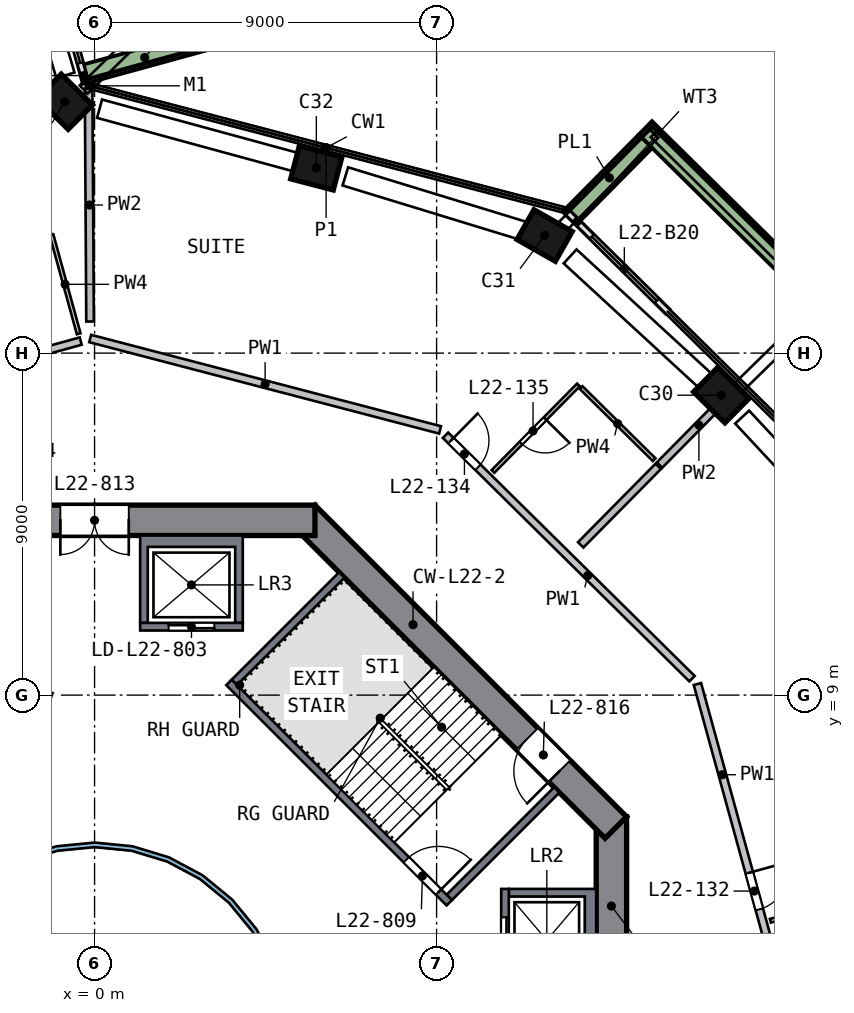
"""IFC4 building model, lengths in metres.
Left out: names, types, materials, properties, quantities, classifications, styles, units other than length and angle.
Written with IfcOpenShell. Run it as: python <this file> out.ifc"""

import sys

from ifc_helpers import new_model, si_unit, direction, frame, frame_2d, origin, origin_2d, place, context, subcontext, project, spatial, polyline, rectangle, outline, extrude, element, fill, save


model = new_model("IFC4")
c1 = context("Model", 3, precision=1e-05, world=origin(), true_north=direction((0.0, 1.0)))
c2 = subcontext(c1, "Body", "Model", "MODEL_VIEW")
j1 = project(units=[si_unit("LENGTHUNIT", "METRE"), si_unit("PLANEANGLEUNIT", "RADIAN")], contexts=[c1])
p1 = place(None, origin())
s1 = spatial("IfcSite", under=j1, at=p1, CompositionType="ELEMENT")
p2 = place(p1, origin())
s2 = spatial("IfcBuilding", under=s1, at=p2, CompositionType="ELEMENT")
p3 = place(p2, frame((0.0, 0.0, 96.5)))
s3 = spatial("IfcBuildingStorey", under=s2, at=p3, CompositionType="ELEMENT", Elevation=96.5)
p4 = place(p3, frame((16.588, 16.798, 0.0), z_axis=(-0.080537401, 0.078255888, 0.993674868), x_axis=(-0.706754906, 0.698489901, -0.112291409)))
e1 = element("IfcColumn", 1, at=p4, inside=s3, PredefinedType="COLUMN", context=c2, shape_type="SweptSolid", body=[
    extrude(rectangle(XDim=1.15, YDim=0.9, at=origin_2d()), origin(), (0.0, 0.0, 1.0), 3.21),
])
p5 = place(p3, frame((11.965, 21.027, 0.0), z_axis=(-0.100506543, 0.056031257, 0.993357404), x_axis=(0.863500308, -0.491046936, 0.115065743)))
e2 = element("IfcColumn", 2, at=p5, inside=s3, PredefinedType="COLUMN", context=c2, shape_type="SweptSolid", body=[
    extrude(rectangle(XDim=1.15, YDim=0.9, at=origin_2d()), origin(), (0.0, 0.0, 1.0), 3.211),
])
p6 = place(p3, frame((5.967, 22.842, 0.0), z_axis=(-0.108904014, 0.027454154, 0.993673078), x_axis=(-0.961432329, 0.251067637, -0.112307249)))
e3 = element("IfcColumn", 3, at=p6, inside=s3, PredefinedType="COLUMN", context=c2, shape_type="SweptSolid", body=[
    extrude(rectangle(XDim=1.15, YDim=0.9, at=origin_2d()), origin(), (0.0, 0.0, 1.0), 3.21),
])
p7 = place(p3, frame((-0.645, 24.621, 0.0), z_axis=(-0.117051977, -0.004028412, 0.99311762), x_axis=(0.704297636, -0.705365784, 0.080149546)))
e4 = element("IfcColumn", 4, at=p7, inside=s3, PredefinedType="COLUMN", context=c2, shape_type="SweptSolid", body=[
    extrude(rectangle(XDim=1.15, YDim=0.9, at=origin_2d()), origin(), (0.0, 0.0, 1.0), 3.212),
])
p8 = place(p3, frame((13.6, -5.799, 0.0), z_axis=(0.0, 0.0, 1.0), x_axis=(0.0, 1.0, 0.0)))
e5 = element("IfcWall", 5, at=p8, inside=s3, PredefinedType="SHEAR", context=c2, shape_type="SweptSolid", body=[
    extrude(rectangle(XDim=11.598, YDim=0.8, at=frame_2d((5.799, 0.0))), origin(), (0.0, 0.0, 1.0), 3.5),
])
p9 = place(p8, frame((4.899, 0.0, 0.0)))
e6 = element("IfcOpeningElement", 6, at=p9, cuts=e5, PredefinedType="OPENING", context=c2, shape_type="SweptSolid", body=[
    extrude(rectangle(XDim=1.8, YDim=2.1, at=frame_2d((0.9, 1.05))), frame((0.0, 0.41, 0.0), z_axis=(0.0, -1.0, 0.0), x_axis=(1.0, 0.0, 0.0)), (0.0, 0.0, 1.0), 0.82),
])
p10 = place(p3, frame((13.717, 5.516, 0.0), z_axis=(0.0, 0.0, 1.0), x_axis=(-0.707106781, 0.707106781, 0.0)))
e7 = element("IfcWall", 7, at=p10, inside=s3, PredefinedType="SHEAR", context=c2, shape_type="SweptSolid", body=[
    extrude(rectangle(XDim=11.598, YDim=0.8, at=frame_2d((5.799, 0.0))), origin(), (0.0, 0.0, 1.0), 3.5),
])
p11 = place(p10, frame((2.099, 0.0, 0.0)))
e8 = element("IfcOpeningElement", 8, at=p11, cuts=e7, PredefinedType="OPENING", context=c2, shape_type="SweptSolid", body=[
    extrude(rectangle(XDim=1.2, YDim=2.1, at=frame_2d((0.6, 1.05))), frame((0.0, 0.41, 0.0), z_axis=(0.0, -1.0, 0.0), x_axis=(1.0, 0.0, 0.0)), (0.0, 0.0, 1.0), 0.82),
])
p12 = place(p3, frame((5.799, 13.6, 0.0), z_axis=(0.0, 0.0, 1.0), x_axis=(-1.0, 0.0, 0.0)))
e9 = element("IfcWall", 9, at=p12, inside=s3, PredefinedType="SHEAR", context=c2, shape_type="SweptSolid", body=[
    extrude(rectangle(XDim=11.598, YDim=0.8, at=frame_2d((5.799, 0.0))), origin(), (0.0, 0.0, 1.0), 3.5),
])
p13 = place(p12, frame((4.899, 0.0, 0.0)))
e10 = element("IfcOpeningElement", 10, at=p13, cuts=e9, PredefinedType="OPENING", context=c2, shape_type="SweptSolid", body=[
    extrude(rectangle(XDim=1.8, YDim=2.1, at=frame_2d((0.9, 1.05))), frame((0.0, 0.41, 0.0), z_axis=(0.0, -1.0, 0.0), x_axis=(1.0, 0.0, 0.0)), (0.0, 0.0, 1.0), 0.82),
])
p14 = place(p3, frame((-0.249, 25.161, 0.0), z_axis=(0.0, 0.0, 1.0), x_axis=(-0.264848083, 0.96429015, 0.0)))
e11 = element("IfcWall", 11, at=p14, inside=s3, PredefinedType="SOLIDWALL", context=c2, shape_type="SweptSolid", body=[
    extrude(rectangle(XDim=3.294, YDim=0.15, at=frame_2d((1.647, 0.0))), origin(), (0.0, 0.0, 1.0), 2.425),
])
p15 = place(p14, frame((0.494, 0.0, 0.0)))
e12 = element("IfcOpeningElement", 12, at=p15, cuts=e11, PredefinedType="OPENING", context=c2, shape_type="SweptSolid", body=[
    extrude(rectangle(XDim=2.4, YDim=2.4, at=frame_2d((1.2, 1.2))), frame((0.0, 0.085, 0.0), z_axis=(0.0, -1.0, 0.0), x_axis=(1.0, 0.0, 0.0)), (0.0, 0.0, 1.0), 0.17),
])
p16 = place(p3, frame((15.079, 19.097, 0.0), z_axis=(0.0, 0.0, 1.0), x_axis=(-0.711534575, 0.702651086, 0.0)))
e13 = element("IfcWall", 13, at=p16, inside=s3, PredefinedType="SOLIDWALL", context=c2, shape_type="SweptSolid", body=[
    extrude(rectangle(XDim=3.71, YDim=0.15, at=frame_2d((1.855, 0.0))), origin(), (0.0, 0.0, 1.0), 2.425),
])
p17 = place(p16, frame((0.4, 0.0, 0.0)))
e14 = element("IfcOpeningElement", 14, at=p17, cuts=e13, PredefinedType="OPENING", context=c2, shape_type="SweptSolid", body=[
    extrude(rectangle(XDim=2.4, YDim=2.4, at=frame_2d((1.2, 1.2))), frame((0.0, 0.085, 0.0), z_axis=(0.0, -1.0, 0.0), x_axis=(1.0, 0.0, 0.0)), (0.0, 0.0, 1.0), 0.17),
])
p18 = place(p3, frame((24.258, 14.284, 0.0), z_axis=(0.0, 0.0, 1.0), x_axis=(-0.711531471, 0.702654229, 0.0)))
e15 = element("IfcWall", 15, at=p18, inside=s3, PredefinedType="SOLIDWALL", context=c2, shape_type="SweptSolid", body=[
    extrude(rectangle(XDim=13.723, YDim=0.5, at=frame_2d((6.862, 0.0))), origin(), (0.0, 0.0, 1.0), 0.7),
])
p19 = place(p3, frame((14.495, 23.573, 0.0), z_axis=(0.0, 0.0, 1.0), x_axis=(-0.702615333, -0.71156988, 0.0)))
e16 = element("IfcWall", 16, at=p19, inside=s3, PredefinedType="SOLIDWALL", context=c2, shape_type="SweptSolid", body=[
    extrude(rectangle(XDim=2.699, YDim=0.5, at=frame_2d((1.35, 0.0))), origin(), (0.0, 0.0, 1.0), 0.7),
])
p20 = place(p3, frame((-0.223, 25.355, 0.0), z_axis=(0.0, 0.0, 1.0), x_axis=(0.964276089, 0.264899272, 0.0)))
e17 = element("IfcWall", 17, at=p20, inside=s3, PredefinedType="SOLIDWALL", context=c2, shape_type="SweptSolid", body=[
    extrude(rectangle(XDim=3.199, YDim=0.5, at=frame_2d((1.6, 0.0))), origin(), (0.0, 0.0, 1.0), 0.7),
])
p21 = place(p3, origin())
e18 = element("IfcWall", 18, at=p21, inside=s3, PredefinedType="SOLIDWALL", context=c2, shape_type="SweptSolid", body=[
    extrude(outline(polyline([(13.2, 3.9), (13.2, 1.2), (10.9, 1.2), (10.9, 1.4), (12.9, 1.4), (12.9, 3.7), (10.9, 3.7), (10.9, 3.9), (13.2, 3.9)])), origin(), (0.0, 0.0, 1.0), 3.19),
])
p22 = place(p3, frame((10.8, 1.2, 0.0), z_axis=(0.0, 0.0, 1.0), x_axis=(0.0, 1.0, 0.0)))
e19 = element("IfcWall", 19, at=p22, inside=s3, PredefinedType="SOLIDWALL", context=c2, shape_type="SweptSolid", body=[
    extrude(rectangle(XDim=2.7, YDim=0.2, at=frame_2d((1.35, 0.0))), origin(), (0.0, 0.0, 1.0), 3.19),
])
p23 = place(p22, frame((0.75, 0.0, 0.0)))
e20 = element("IfcOpeningElement", 20, at=p23, cuts=e19, PredefinedType="OPENING", context=c2, shape_type="SweptSolid", body=[
    extrude(rectangle(XDim=1.2, YDim=2.1, at=frame_2d((0.6, 1.05))), frame((0.0, 0.11, 0.0), z_axis=(0.0, -1.0, 0.0), x_axis=(1.0, 0.0, 0.0)), (0.0, 0.0, 1.0), 0.22),
])
p24 = place(p3, origin())
e21 = element("IfcWall", 21, at=p24, inside=s3, PredefinedType="SOLIDWALL", context=c2, shape_type="SweptSolid", body=[
    extrude(outline(polyline([(3.9, 13.2), (3.9, 10.9), (3.7, 10.9), (3.7, 12.9), (1.4, 12.9), (1.4, 10.9), (1.2, 10.9), (1.2, 13.2), (3.9, 13.2)])), origin(), (0.0, 0.0, 1.0), 3.19),
])
p25 = place(p3, frame((1.2, 10.8, 0.0), z_axis=(0.0, 0.0, 1.0), x_axis=(1.0, 0.0, 0.0)))
e22 = element("IfcWall", 22, at=p25, inside=s3, PredefinedType="SOLIDWALL", context=c2, shape_type="SweptSolid", body=[
    extrude(rectangle(XDim=2.7, YDim=0.2, at=frame_2d((1.35, 0.0))), origin(), (0.0, 0.0, 1.0), 3.19),
])
p26 = place(p25, frame((0.75, 0.0, 0.0)))
e23 = element("IfcOpeningElement", 23, at=p26, cuts=e22, PredefinedType="OPENING", context=c2, shape_type="SweptSolid", body=[
    extrude(rectangle(XDim=1.2, YDim=2.1, at=frame_2d((0.6, 1.05))), frame((0.0, 0.11, 0.0), z_axis=(0.0, -1.0, 0.0), x_axis=(1.0, 0.0, 0.0)), (0.0, 0.0, 1.0), 0.22),
])
p27 = place(p3, frame((3.535, 9.334, 0.0), z_axis=(0.0, 0.0, 1.0), x_axis=(0.707106781, -0.707106781, 0.0)))
e24 = element("IfcWall", 24, at=p27, inside=s3, PredefinedType="SOLIDWALL", context=c2, shape_type="SweptSolid", body=[
    extrude(rectangle(XDim=8.2, YDim=0.2, at=frame_2d((4.1, 0.0))), origin(), (0.0, 0.0, 1.0), 3.19),
])
p28 = place(p27, frame((6.6, 0.0, 0.0)))
e25 = element("IfcOpeningElement", 25, at=p28, cuts=e24, PredefinedType="OPENING", context=c2, shape_type="SweptSolid", body=[
    extrude(rectangle(XDim=1.2, YDim=2.1, at=frame_2d((0.6, 1.05))), frame((0.0, 0.11, 0.0), z_axis=(0.0, -1.0, 0.0), x_axis=(1.0, 0.0, 0.0)), (0.0, 0.0, 1.0), 0.22),
])
for number, where, z_axis, x_axis in (
    (26, (9.334, 3.677, 0.0), (0.0, 0.0, 1.0), (0.707, 0.707, 0.0)),
    (27, (3.677, 9.334, 0.0), (0.0, 0.0, 1.0), (0.707, 0.707, 0.0)),
):
    element("IfcWall", number, at=place(p3, frame(where, z_axis=z_axis, x_axis=x_axis)), inside=s3, PredefinedType="SOLIDWALL", context=c2, shape_type="SweptSolid", body=[
        extrude(rectangle(XDim=4.0, YDim=0.2, at=frame_2d((2.0, 0.0))), origin(), (0.0, 0.0, 1.0), 3.19),
    ])
p29 = place(p3, origin())
e28 = element("IfcWall", 28, at=p29, inside=s3, PredefinedType="SOLIDWALL", context=c2, shape_type="SweptSolid", body=[
    extrude(outline(polyline([(5.021, -0.999), (4.73, -1.959), (4.257, -2.844), (3.62, -3.62), (2.844, -4.257), (1.959, -4.73), (0.999, -5.021), (0.0, -5.12), (-0.999, -5.021), (-1.959, -4.73), (-2.844, -4.257), (-3.62, -3.62), (-4.257, -2.844), (-4.73, -1.959), (-5.021, -0.999), (-5.12, 0.0), (-5.021, 0.999), (-4.73, 1.959), (-4.257, 2.844), (-3.62, 3.62), (-2.844, 4.257), (-1.959, 4.73), (-0.999, 5.021), (0.0, 5.12), (0.999, 5.021), (1.959, 4.73), (2.844, 4.257), (3.62, 3.62), (4.257, 2.844), (4.73, 1.959), (5.021, 0.999), (5.12, 0.0), (5.021, -0.999)]), holes=[polyline([(4.904, 0.976), (4.619, 1.913), (4.157, 2.778), (3.535, 3.535), (2.778, 4.157), (1.913, 4.619), (0.976, 4.904), (0.0, 5.0), (-0.976, 4.904), (-1.913, 4.619), (-2.778, 4.157), (-3.535, 3.535), (-4.157, 2.778), (-4.619, 1.913), (-4.904, 0.976), (-5.0, 0.0), (-4.904, -0.976), (-4.619, -1.913), (-4.157, -2.778), (-3.535, -3.535), (-2.778, -4.157), (-1.913, -4.619), (-0.976, -4.904), (0.0, -5.0), (0.976, -4.904), (1.913, -4.619), (2.778, -4.157), (3.535, -3.535), (4.157, -2.778), (4.619, -1.913), (4.904, -0.976), (5.0, 0.0), (4.904, 0.976)])]), origin(), (0.0, 0.0, 1.0), 3.19),
])
p30 = place(p3, frame((-0.365, 18.316, 0.0), z_axis=(0.0, 0.0, 1.0), x_axis=(-0.964283368, -0.264872773, 0.0)))
e29 = element("IfcWall", 29, at=p30, inside=s3, PredefinedType="SOLIDWALL", context=c2, shape_type="SweptSolid", body=[
    extrude(rectangle(XDim=3.4, YDim=0.2, at=frame_2d((1.7, 0.0))), origin(), (0.0, 0.0, 1.0), 3.19),
])
p31 = place(p3, frame((9.092, 15.979, 0.0), z_axis=(0.0, 0.0, 1.0), x_axis=(-0.967528939, 0.252760265, 0.0)))
e30 = element("IfcWall", 30, at=p31, inside=s3, PredefinedType="SOLIDWALL", context=c2, shape_type="SweptSolid", body=[
    extrude(rectangle(XDim=9.516, YDim=0.2, at=frame_2d((4.758, 0.0))), origin(), (0.0, 0.0, 1.0), 3.19),
])
p32 = place(p3, frame((9.235, 15.838, 0.0), z_axis=(0.0, 0.0, 1.0), x_axis=(0.71153875, -0.702646859, 0.0)))
e31 = element("IfcWall", 31, at=p32, inside=s3, PredefinedType="SOLIDWALL", context=c2, shape_type="SweptSolid", body=[
    extrude(rectangle(XDim=9.115, YDim=0.2, at=frame_2d((4.558, 0.0))), origin(), (0.0, 0.0, 1.0), 3.19),
])
p33 = place(p32, frame((0.2, 0.0, 0.0)))
e32 = element("IfcOpeningElement", 32, at=p33, cuts=e31, PredefinedType="OPENING", context=c2, shape_type="SweptSolid", body=[
    extrude(rectangle(XDim=1.0, YDim=2.1, at=frame_2d((0.5, 1.05))), frame((0.0, 0.11, 0.0), z_axis=(0.0, -1.0, 0.0), x_axis=(1.0, 0.0, 0.0)), (0.0, 0.0, 1.0), 0.22),
])
p34 = place(p3, frame((15.864, 9.292, 0.0), z_axis=(0.0, 0.0, 1.0), x_axis=(0.264866543, -0.96428508, 0.0)))
e33 = element("IfcWall", 33, at=p34, inside=s3, PredefinedType="SOLIDWALL", context=c2, shape_type="SweptSolid", body=[
    extrude(rectangle(XDim=9.316, YDim=0.2, at=frame_2d((4.658, 0.0))), origin(), (0.0, 0.0, 1.0), 3.19),
])
p35 = place(p34, frame((5.15, 0.0, 0.0)))
e34 = element("IfcOpeningElement", 34, at=p35, cuts=e33, PredefinedType="OPENING", context=c2, shape_type="SweptSolid", body=[
    extrude(rectangle(XDim=1.0, YDim=2.1, at=frame_2d((0.5, 1.05))), frame((0.0, 0.11, 0.0), z_axis=(0.0, -1.0, 0.0), x_axis=(1.0, 0.0, 0.0)), (0.0, 0.0, 1.0), 0.22),
])
p36 = place(p3, frame((-0.157, 24.964, 0.0), z_axis=(0.0, 0.0, 1.0), x_axis=(0.006290436, -0.999980215, 0.0)))
e35 = element("IfcWall", 35, at=p36, inside=s3, PredefinedType="SOLIDWALL", context=c2, shape_type="SweptSolid", body=[
    extrude(rectangle(XDim=6.132, YDim=0.2, at=frame_2d((3.066, 0.0))), origin(), (0.0, 0.0, 1.0), 3.19),
])
p37 = place(p3, frame((12.792, 12.954, 0.0), z_axis=(0.0, 0.0, 1.0), x_axis=(0.702638225, 0.711547275, 0.0)))
e36 = element("IfcWall", 36, at=p37, inside=s3, PredefinedType="SOLIDWALL", context=c2, shape_type="SweptSolid", body=[
    extrude(rectangle(XDim=2.905, YDim=0.2, at=frame_2d((1.452, 0.0))), origin(), (0.0, 0.0, 1.0), 3.19),
])
p38 = place(p3, frame((14.865, 15.053, 0.0), z_axis=(0.0, 0.0, 1.0), x_axis=(0.702668179, 0.711517695, 0.0)))
e37 = element("IfcWall", 37, at=p38, inside=s3, PredefinedType="SOLIDWALL", context=c2, shape_type="SweptSolid", body=[
    extrude(rectangle(XDim=2.952, YDim=0.2, at=frame_2d((1.476, 0.0))), origin(), (0.0, 0.0, 1.0), 3.19),
])
p39 = place(p3, frame((-0.417, 18.509, 0.0), z_axis=(0.0, 0.0, 1.0), x_axis=(-0.264937907, 0.964265475, 0.0)))
e38 = element("IfcWall", 38, at=p39, inside=s3, PredefinedType="PARTITIONING", context=c2, shape_type="SweptSolid", body=[
    extrude(rectangle(XDim=2.7, YDim=0.1, at=frame_2d((1.35, 0.0))), origin(), (0.0, 0.0, 1.0), 3.19),
])
p40 = place(p3, frame((12.732, 17.163, 0.0), z_axis=(0.0, 0.0, 1.0), x_axis=(-0.702667882, -0.711517988, 0.0)))
e39 = element("IfcWall", 39, at=p40, inside=s3, PredefinedType="PARTITIONING", context=c2, shape_type="SweptSolid", body=[
    extrude(rectangle(XDim=3.2, YDim=0.1, at=frame_2d((1.6, 0.0))), origin(), (0.0, 0.0, 1.0), 3.19),
])
p41 = place(p40, frame((1.25, 0.0, 0.0)))
e40 = element("IfcOpeningElement", 40, at=p41, cuts=e39, PredefinedType="OPENING", context=c2, shape_type="SweptSolid", body=[
    extrude(rectangle(XDim=0.9, YDim=2.1, at=frame_2d((0.45, 1.05))), frame((0.0, 0.06, 0.0), z_axis=(0.0, -1.0, 0.0), x_axis=(1.0, 0.0, 0.0)), (0.0, 0.0, 1.0), 0.12),
])
p42 = place(p3, frame((12.803, 17.093, 0.0), z_axis=(0.0, 0.0, 1.0), x_axis=(0.711523533, -0.702662267, 0.0)))
e41 = element("IfcWall", 41, at=p42, inside=s3, PredefinedType="PARTITIONING", context=c2, shape_type="SweptSolid", body=[
    extrude(rectangle(XDim=2.7, YDim=0.1, at=frame_2d((1.35, 0.0))), origin(), (0.0, 0.0, 1.0), 3.19),
])
p43 = place(p3, frame((20.772, 3.883, 0.0), z_axis=(0.0, 0.0, 1.0), x_axis=(-0.964267784, -0.264929502, 0.0)))
e42 = element("IfcWall", 42, at=p43, inside=s3, PredefinedType="PARTITIONING", context=c2, shape_type="SweptSolid", body=[
    extrude(rectangle(XDim=3.1, YDim=0.1, at=frame_2d((1.55, 0.0))), origin(), (0.0, 0.0, 1.0), 3.19),
])
p44 = place(p43, frame((1.15, 0.0, 0.0)))
e43 = element("IfcOpeningElement", 43, at=p44, cuts=e42, PredefinedType="OPENING", context=c2, shape_type="SweptSolid", body=[
    extrude(rectangle(XDim=0.9, YDim=2.1, at=frame_2d((0.45, 1.05))), frame((0.0, 0.06, 0.0), z_axis=(0.0, -1.0, 0.0), x_axis=(1.0, 0.0, 0.0)), (0.0, 0.0, 1.0), 0.12),
])
p45 = place(p15, origin())
e44 = element("IfcDoor", 44, at=p45, inside=s3, OperationType="SLIDING_TO_LEFT", PredefinedType="DOOR", context=c2, shape_type="SweptSolid", body=[
    extrude(rectangle(XDim=2.4, YDim=2.4, at=frame_2d((1.2, 1.2))), frame((0.0, 0.025, 0.0), z_axis=(0.0, -1.0, 0.0), x_axis=(1.0, 0.0, 0.0)), (0.0, 0.0, 1.0), 0.05),
])
fill(e12, e44)
p46 = place(p17, origin())
e45 = element("IfcDoor", 45, at=p46, inside=s3, OperationType="SLIDING_TO_RIGHT", PredefinedType="DOOR", context=c2, shape_type="SweptSolid", body=[
    extrude(rectangle(XDim=2.4, YDim=2.4, at=frame_2d((1.2, 1.2))), frame((0.0, 0.025, 0.0), z_axis=(0.0, -1.0, 0.0), x_axis=(1.0, 0.0, 0.0)), (0.0, 0.0, 1.0), 0.05),
])
fill(e14, e45)
p47 = place(p23, origin())
e46 = element("IfcDoor", 46, at=p47, inside=s3, OperationType="DOUBLE_DOOR_SLIDING", PredefinedType="DOOR", context=c2, shape_type="SweptSolid", body=[
    extrude(rectangle(XDim=1.2, YDim=2.1, at=frame_2d((0.6, 1.05))), frame((0.0, 0.025, 0.0), z_axis=(0.0, -1.0, 0.0), x_axis=(1.0, 0.0, 0.0)), (0.0, 0.0, 1.0), 0.05),
])
fill(e20, e46)
p48 = place(p26, origin())
e47 = element("IfcDoor", 47, at=p48, inside=s3, OperationType="DOUBLE_DOOR_SLIDING", PredefinedType="DOOR", context=c2, shape_type="SweptSolid", body=[
    extrude(rectangle(XDim=1.2, YDim=2.1, at=frame_2d((0.6, 1.05))), frame((0.0, 0.025, 0.0), z_axis=(0.0, -1.0, 0.0), x_axis=(1.0, 0.0, 0.0)), (0.0, 0.0, 1.0), 0.05),
])
fill(e23, e47)
p49 = place(p28, origin())
e48 = element("IfcDoor", 48, at=p49, inside=s3, OperationType="SINGLE_SWING_RIGHT", PredefinedType="DOOR", context=c2, shape_type="SweptSolid", body=[
    extrude(rectangle(XDim=1.2, YDim=2.1, at=frame_2d((0.6, 1.05))), frame((0.0, 0.025, 0.0), z_axis=(0.0, -1.0, 0.0), x_axis=(1.0, 0.0, 0.0)), (0.0, 0.0, 1.0), 0.05),
])
fill(e25, e48)
p50 = place(p13, origin())
e49 = element("IfcDoor", 49, at=p50, inside=s3, OperationType="DOUBLE_DOOR_SINGLE_SWING", PredefinedType="DOOR", context=c2, shape_type="SweptSolid", body=[
    extrude(rectangle(XDim=1.8, YDim=2.1, at=frame_2d((0.9, 1.05))), frame((0.0, 0.025, 0.0), z_axis=(0.0, -1.0, 0.0), x_axis=(1.0, 0.0, 0.0)), (0.0, 0.0, 1.0), 0.05),
])
fill(e10, e49)
p51 = place(p11, origin())
e50 = element("IfcDoor", 50, at=p51, inside=s3, OperationType="SINGLE_SWING_LEFT", PredefinedType="DOOR", context=c2, shape_type="SweptSolid", body=[
    extrude(rectangle(XDim=1.2, YDim=2.1, at=frame_2d((0.6, 1.05))), frame((0.0, 0.025, 0.0), z_axis=(0.0, -1.0, 0.0), x_axis=(1.0, 0.0, 0.0)), (0.0, 0.0, 1.0), 0.05),
])
fill(e8, e50)
p52 = place(p35, origin())
e51 = element("IfcDoor", 51, at=p52, inside=s3, OperationType="SINGLE_SWING_LEFT", PredefinedType="DOOR", context=c2, shape_type="SweptSolid", body=[
    extrude(rectangle(XDim=1.0, YDim=2.1, at=frame_2d((0.5, 1.05))), frame((0.0, 0.025, 0.0), z_axis=(0.0, -1.0, 0.0), x_axis=(1.0, 0.0, 0.0)), (0.0, 0.0, 1.0), 0.05),
])
fill(e34, e51)
p53 = place(p33, origin())
e52 = element("IfcDoor", 52, at=p53, inside=s3, OperationType="SINGLE_SWING_LEFT", PredefinedType="DOOR", context=c2, shape_type="SweptSolid", body=[
    extrude(rectangle(XDim=1.0, YDim=2.1, at=frame_2d((0.5, 1.05))), frame((0.0, 0.025, 0.0), z_axis=(0.0, -1.0, 0.0), x_axis=(1.0, 0.0, 0.0)), (0.0, 0.0, 1.0), 0.05),
])
fill(e32, e52)
p54 = place(p41, origin())
e53 = element("IfcDoor", 53, at=p54, inside=s3, OperationType="SINGLE_SWING_LEFT", PredefinedType="DOOR", context=c2, shape_type="SweptSolid", body=[
    extrude(rectangle(XDim=0.9, YDim=2.1, at=frame_2d((0.45, 1.05))), frame((0.0, 0.025, 0.0), z_axis=(0.0, -1.0, 0.0), x_axis=(1.0, 0.0, 0.0)), (0.0, 0.0, 1.0), 0.05),
])
fill(e40, e53)
save(model, sys.argv[1])
